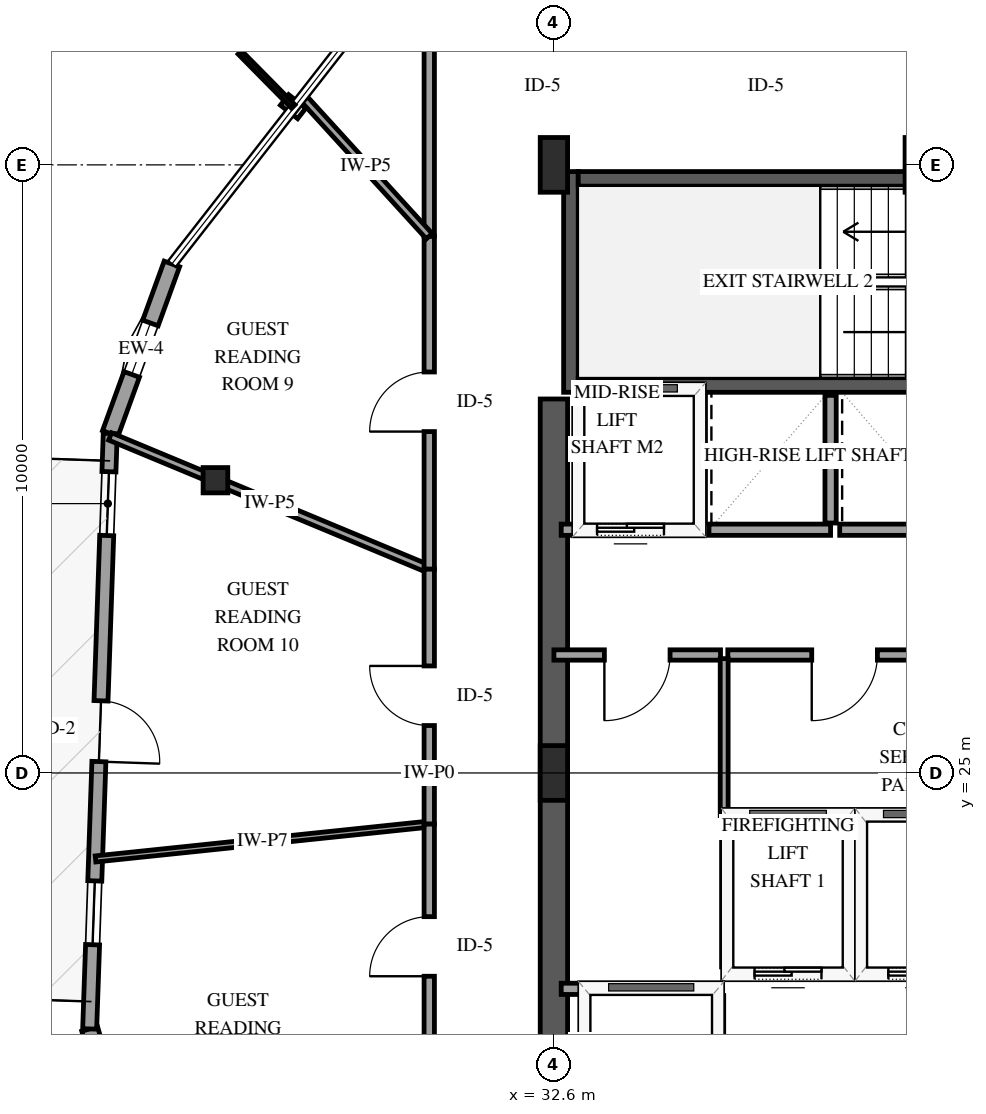
"""IFC4 building model, lengths in metres.
Left out: names, types, materials, properties, quantities, classifications, styles, units other than length and angle.
Written with IfcOpenShell. Run it as: python <this file> out.ifc"""

import sys

from ifc_helpers import new_model, si_unit, direction, frame, frame_2d, origin, origin_2d, place, context, subcontext, project, spatial, rectangle, i_section, extrude, element, fill, save


model = new_model("IFC4")
c1 = context("Model", 3, precision=1e-05, world=origin(), true_north=direction((0.0, 1.0)))
c2 = subcontext(c1, "Body", "Model", "MODEL_VIEW")
j1 = project(units=[si_unit("LENGTHUNIT", "METRE"), si_unit("PLANEANGLEUNIT", "RADIAN")], contexts=[c1])
p1 = place(None, origin())
s1 = spatial("IfcSite", under=j1, at=p1, CompositionType="ELEMENT")
p2 = place(p1, origin())
s2 = spatial("IfcBuilding", under=s1, at=p2, CompositionType="ELEMENT")
p3 = place(p2, frame((0.0, 0.0, 223.0)))
s3 = spatial("IfcBuildingStorey", under=s2, at=p3, CompositionType="ELEMENT", Elevation=223.0)
p4 = place(p3, frame((32.88, 31.26, 0.0), z_axis=(0.0, 0.0, 1.0), x_axis=(0.0, 1.0, 0.0)))
e1 = element("IfcWall", 1, at=p4, inside=s3, PredefinedType="SHEAR", context=c2, shape_type="SweptSolid", body=[
    extrude(rectangle(XDim=3.63, YDim=0.24, at=frame_2d((1.815, 0.0))), origin(), (0.0, 0.0, 1.0), 3.6),
])
for number, where, z_axis, x_axis in (
    (2, (33.0, 31.38, 0.0), (0.0, 0.0, 1.0), (1.0, 0.0, 0.0)),
    (3, (33.0, 34.77, 0.0), (0.0, 0.0, 1.0), (1.0, 0.0, 0.0)),
):
    element("IfcWall", number, at=place(p3, frame(where, z_axis=z_axis, x_axis=x_axis)), inside=s3, PredefinedType="SHEAR", context=c2, shape_type="SweptSolid", body=[
        extrude(rectangle(XDim=8.0, YDim=0.24, at=frame_2d((4.0, 0.0))), origin(), (0.0, 0.0, 1.0), 3.6),
    ])
p5 = place(p3, frame((32.6, 18.85, 0.0), z_axis=(0.0, 0.0, 1.0), x_axis=(0.0, 1.0, 0.0)))
e4 = element("IfcWall", 4, at=p5, inside=s3, PredefinedType="SHEAR", context=c2, shape_type="SweptSolid", body=[
    extrude(rectangle(XDim=12.3, YDim=0.45, at=frame_2d((6.15, 0.0))), origin(), (0.0, 0.0, 1.0), 3.6),
])
for number, where, z_axis, x_axis in (
    (5, (32.6, 25.0, 0.0), (0.0, 0.0, 1.0), (1.0, 0.0, 0.0)),
    (6, (32.6, 35.0, 0.0), (0.0, 0.0, 1.0), (1.0, 0.0, 0.0)),
    (7, (38.6, 35.0, 0.0), (0.0, 0.0, 1.0), (1.0, 0.0, 0.0)),
):
    element("IfcColumn", number, at=place(p3, frame(where, z_axis=z_axis, x_axis=x_axis)), inside=s3, PredefinedType="PILASTER", context=c2, shape_type="SweptSolid", body=[
        extrude(rectangle(XDim=0.45, YDim=0.9, at=origin_2d()), origin(), (0.0, 0.0, 1.0), 3.6),
    ])
p6 = place(p3, frame((27.034, 29.814, 0.0), z_axis=(0.0, 0.0, 1.0), x_axis=(1.0, 0.0, 0.0)))
e8 = element("IfcColumn", 8, at=p6, inside=s3, PredefinedType="COLUMN", context=c2, shape_type="SweptSolid", body=[
    extrude(i_section(OverallWidth=0.406, OverallDepth=0.416, WebThickness=0.03, FlangeThickness=0.048, FilletRadius=0.038, at=origin_2d()), origin(), (0.0, 0.0, 1.0), 3.6),
])
p7 = place(p3, frame((26.318, 33.371, 0.0), z_axis=(0.0, 0.0, 1.0), x_axis=(-0.341716630291, -0.939803034993, 0.0)))
e9 = element("IfcWall", 9, at=p7, inside=s3, PredefinedType="SOLIDWALL", context=c2, shape_type="SweptSolid", body=[
    extrude(rectangle(XDim=2.966, YDim=0.27, at=frame_2d((1.483, 0.0))), origin(), (0.0, 0.0, 1.0), 2.679),
])
p8 = place(p7, frame((1.033, 0.0, 0.75)))
e10 = element("IfcOpeningElement", 10, at=p8, cuts=e9, PredefinedType="OPENING", context=c2, shape_type="SweptSolid", body=[
    extrude(rectangle(XDim=0.9, YDim=1.5, at=frame_2d((0.45, 0.75))), frame((0.0, 0.145, 0.0), z_axis=(0.0, -1.0, 0.0), x_axis=(1.0, 0.0, 0.0)), (0.0, 0.0, 1.0), 0.29),
])
p9 = place(p3, frame((24.966, 20.791, 0.0), z_axis=(0.0, 0.0, 1.0), x_axis=(0.275927353379, -0.961178493131, 0.0)))
e11 = element("IfcWall", 11, at=p9, inside=s3, PredefinedType="SOLIDWALL", context=c2, shape_type="SweptSolid", body=[
    extrude(rectangle(XDim=2.967, YDim=0.27, at=frame_2d((1.483, 0.0))), origin(), (0.0, 0.0, 1.0), 2.679),
])
p10 = place(p9, frame((1.033, 0.0, 0.75)))
e12 = element("IfcOpeningElement", 12, at=p10, cuts=e11, PredefinedType="OPENING", context=c2, shape_type="SweptSolid", body=[
    extrude(rectangle(XDim=0.9, YDim=1.5, at=frame_2d((0.45, 0.75))), frame((0.0, 0.145, 0.0), z_axis=(0.0, -1.0, 0.0), x_axis=(1.0, 0.0, 0.0)), (0.0, 0.0, 1.0), 0.29),
])
p11 = place(p3, frame((25.304, 30.583, 0.0), z_axis=(0.0, 0.0, 1.0), x_axis=(-0.034536942247, -0.999403421857, 0.0)))
e13 = element("IfcWall", 13, at=p11, inside=s3, PredefinedType="SOLIDWALL", context=c2, shape_type="SweptSolid", body=[
    extrude(rectangle(XDim=9.798, YDim=0.23, at=frame_2d((4.899, 0.0))), origin(), (0.0, 0.0, 1.0), 2.679),
])
p12 = place(p11, frame((4.399, 0.0, 0.0)))
e14 = element("IfcOpeningElement", 14, at=p12, cuts=e13, PredefinedType="OPENING", context=c2, shape_type="SweptSolid", body=[
    extrude(rectangle(XDim=1.0, YDim=2.15, at=frame_2d((0.5, 1.075))), frame((0.0, 0.125, 0.0), z_axis=(0.0, -1.0, 0.0), x_axis=(1.0, 0.0, 0.0)), (0.0, 0.0, 1.0), 0.25),
])
p13 = place(p11, frame((0.629, 0.0, 0.72)))
e15 = element("IfcOpeningElement", 15, at=p13, cuts=e13, PredefinedType="OPENING", context=c2, shape_type="SweptSolid", body=[
    extrude(rectangle(XDim=1.05, YDim=1.55, at=frame_2d((0.525, 0.775))), frame((0.0, 0.125, 0.0), z_axis=(0.0, -1.0, 0.0), x_axis=(1.0, 0.0, 0.0)), (0.0, 0.0, 1.0), 0.25),
])
p14 = place(p11, frame((7.362, 0.0, 0.72)))
e16 = element("IfcOpeningElement", 16, at=p14, cuts=e13, PredefinedType="OPENING", context=c2, shape_type="SweptSolid", body=[
    extrude(rectangle(XDim=1.05, YDim=1.55, at=frame_2d((0.525, 0.775))), frame((0.0, 0.125, 0.0), z_axis=(0.0, -1.0, 0.0), x_axis=(1.0, 0.0, 0.0)), (0.0, 0.0, 1.0), 0.25),
])
p15 = place(p3, frame((35.45, 21.7, 0.0), z_axis=(0.0, 0.0, 1.0), x_axis=(1.0, 0.0, 0.0)))
e17 = element("IfcWall", 17, at=p15, inside=s3, PredefinedType="SOLIDWALL", context=c2, shape_type="SweptSolid", body=[
    extrude(rectangle(XDim=2.0, YDim=0.185, at=frame_2d((1.0, 0.0))), origin(), (0.0, 0.0, 1.0), 3.3),
])
p16 = place(p15, frame((0.45, 0.0, 0.0)))
e18 = element("IfcOpeningElement", 18, at=p16, cuts=e17, PredefinedType="OPENING", context=c2, shape_type="SweptSolid", body=[
    extrude(rectangle(XDim=1.1, YDim=2.15, at=frame_2d((0.55, 1.075))), frame((0.0, 0.103, 0.0), z_axis=(0.0, -1.0, 0.0), x_axis=(1.0, 0.0, 0.0)), (0.0, 0.0, 1.0), 0.205),
])
p17 = place(p3, frame((35.45, 24.3, 0.0), z_axis=(0.0, 0.0, 1.0), x_axis=(1.0, 0.0, 0.0)))
e19 = element("IfcWall", 19, at=p17, inside=s3, PredefinedType="SOLIDWALL", context=c2, shape_type="SweptSolid", body=[
    extrude(rectangle(XDim=2.0, YDim=0.185, at=frame_2d((1.0, 0.0))), origin(), (0.0, 0.0, 1.0), 3.3),
])
for number, where, z_axis, x_axis in (
    (20, (35.45, 21.81, 0.0), (0.0, 0.0, 1.0), (0.0, 1.0, 0.0)),
    (21, (37.45, 21.81, 0.0), (0.0, 0.0, 1.0), (0.0, 1.0, 0.0)),
):
    element("IfcWall", number, at=place(p3, frame(where, z_axis=z_axis, x_axis=x_axis)), inside=s3, PredefinedType="SOLIDWALL", context=c2, shape_type="SweptSolid", body=[
        extrude(rectangle(XDim=2.38, YDim=0.185, at=frame_2d((1.19, 0.0))), origin(), (0.0, 0.0, 1.0), 3.3),
    ])
p18 = place(p3, frame((37.65, 21.7, 0.0), z_axis=(0.0, 0.0, 1.0), x_axis=(1.0, 0.0, 0.0)))
e22 = element("IfcWall", 22, at=p18, inside=s3, PredefinedType="SOLIDWALL", context=c2, shape_type="SweptSolid", body=[
    extrude(rectangle(XDim=2.0, YDim=0.185, at=frame_2d((1.0, 0.0))), origin(), (0.0, 0.0, 1.0), 3.3),
])
p19 = place(p18, frame((0.45, 0.0, 0.0)))
e23 = element("IfcOpeningElement", 23, at=p19, cuts=e22, PredefinedType="OPENING", context=c2, shape_type="SweptSolid", body=[
    extrude(rectangle(XDim=1.1, YDim=2.15, at=frame_2d((0.55, 1.075))), frame((0.0, 0.103, 0.0), z_axis=(0.0, -1.0, 0.0), x_axis=(1.0, 0.0, 0.0)), (0.0, 0.0, 1.0), 0.205),
])
p20 = place(p3, frame((37.65, 24.3, 0.0), z_axis=(0.0, 0.0, 1.0), x_axis=(1.0, 0.0, 0.0)))
e24 = element("IfcWall", 24, at=p20, inside=s3, PredefinedType="SOLIDWALL", context=c2, shape_type="SweptSolid", body=[
    extrude(rectangle(XDim=2.0, YDim=0.185, at=frame_2d((1.0, 0.0))), origin(), (0.0, 0.0, 1.0), 3.3),
])
p21 = place(p3, frame((32.72, 21.45, 0.0), z_axis=(0.0, 0.0, 1.0), x_axis=(1.0, 0.0, 0.0)))
e25 = element("IfcWall", 25, at=p21, inside=s3, PredefinedType="SOLIDWALL", context=c2, shape_type="SweptSolid", body=[
    extrude(rectangle(XDim=2.58, YDim=0.185, at=frame_2d((1.29, 0.0))), origin(), (0.0, 0.0, 1.0), 3.3),
])
p22 = place(p3, frame((35.3, 18.79, 0.0), z_axis=(0.0, 0.0, 1.0), x_axis=(0.0, 1.0, 0.0)))
e26 = element("IfcWall", 26, at=p22, inside=s3, PredefinedType="SOLIDWALL", context=c2, shape_type="SweptSolid", body=[
    extrude(rectangle(XDim=2.55, YDim=0.185, at=frame_2d((1.275, 0.0))), origin(), (0.0, 0.0, 1.0), 3.3),
])
p23 = place(p22, frame((0.725, 0.0, 0.0)))
e27 = element("IfcOpeningElement", 27, at=p23, cuts=e26, PredefinedType="OPENING", context=c2, shape_type="SweptSolid", body=[
    extrude(rectangle(XDim=1.1, YDim=2.15, at=frame_2d((0.55, 1.075))), frame((0.0, 0.103, 0.0), z_axis=(0.0, -1.0, 0.0), x_axis=(1.0, 0.0, 0.0)), (0.0, 0.0, 1.0), 0.205),
])
p24 = place(p3, frame((32.72, 29.0, 0.0), z_axis=(0.0, 0.0, 1.0), x_axis=(1.0, 0.0, 0.0)))
e28 = element("IfcWall", 28, at=p24, inside=s3, PredefinedType="SOLIDWALL", context=c2, shape_type="SweptSolid", body=[
    extrude(rectangle(XDim=2.28, YDim=0.185, at=frame_2d((1.14, 0.0))), origin(), (0.0, 0.0, 1.0), 3.3),
])
p25 = place(p24, frame((0.59, 0.0, 0.0)))
e29 = element("IfcOpeningElement", 29, at=p25, cuts=e28, PredefinedType="OPENING", context=c2, shape_type="SweptSolid", body=[
    extrude(rectangle(XDim=1.1, YDim=2.15, at=frame_2d((0.55, 1.075))), frame((0.0, 0.103, 0.0), z_axis=(0.0, -1.0, 0.0), x_axis=(1.0, 0.0, 0.0)), (0.0, 0.0, 1.0), 0.205),
])
p26 = place(p3, frame((35.0, 29.11, 0.0), z_axis=(0.0, 0.0, 1.0), x_axis=(0.0, 1.0, 0.0)))
e30 = element("IfcWall", 30, at=p26, inside=s3, PredefinedType="SOLIDWALL", context=c2, shape_type="SweptSolid", body=[
    extrude(rectangle(XDim=2.1, YDim=0.185, at=frame_2d((1.05, 0.0))), origin(), (0.0, 0.0, 1.0), 3.3),
])
p27 = place(p3, frame((35.15, 29.0, 0.0), z_axis=(0.0, 0.0, 1.0), x_axis=(1.0, 0.0, 0.0)))
e31 = element("IfcWall", 31, at=p27, inside=s3, PredefinedType="SOLIDWALL", context=c2, shape_type="SweptSolid", body=[
    extrude(rectangle(XDim=2.0, YDim=0.185, at=frame_2d((1.0, 0.0))), origin(), (0.0, 0.0, 1.0), 3.3),
])
p28 = place(p3, frame((37.15, 29.11, 0.0), z_axis=(0.0, 0.0, 1.0), x_axis=(0.0, 1.0, 0.0)))
e32 = element("IfcWall", 32, at=p28, inside=s3, PredefinedType="SOLIDWALL", context=c2, shape_type="SweptSolid", body=[
    extrude(rectangle(XDim=2.1, YDim=0.185, at=frame_2d((1.05, 0.0))), origin(), (0.0, 0.0, 1.0), 3.3),
])
p29 = place(p3, frame((37.3, 29.0, 0.0), z_axis=(0.0, 0.0, 1.0), x_axis=(1.0, 0.0, 0.0)))
e33 = element("IfcWall", 33, at=p29, inside=s3, PredefinedType="SOLIDWALL", context=c2, shape_type="SweptSolid", body=[
    extrude(rectangle(XDim=2.0, YDim=0.185, at=frame_2d((1.0, 0.0))), origin(), (0.0, 0.0, 1.0), 3.3),
])
p30 = place(p3, frame((30.55, 28.351, 0.0), z_axis=(0.0, 0.0, 1.0), x_axis=(-0.923315654645, 0.384041927251, 0.0)))
e34 = element("IfcWall", 34, at=p30, inside=s3, PredefinedType="PARTITIONING", context=c2, shape_type="SweptSolid", body=[
    extrude(rectangle(XDim=5.684, YDim=0.13, at=frame_2d((2.842, 0.0))), origin(), (0.0, 0.0, 1.0), 3.3),
])
p31 = place(p3, frame((30.55, 24.159, 0.0), z_axis=(0.0, 0.0, 1.0), x_axis=(-0.994593588522, -0.103844083467, 0.0)))
e35 = element("IfcWall", 35, at=p31, inside=s3, PredefinedType="PARTITIONING", context=c2, shape_type="SweptSolid", body=[
    extrude(rectangle(XDim=5.518, YDim=0.1, at=frame_2d((2.759, 0.0))), origin(), (0.0, 0.0, 1.0), 2.674),
])
p32 = place(p3, frame((30.55, 28.351, 0.0), z_axis=(0.0, 0.0, 1.0), x_axis=(0.0, 1.0, 0.0)))
e36 = element("IfcWall", 36, at=p32, inside=s3, PredefinedType="PARTITIONING", context=c2, shape_type="SweptSolid", body=[
    extrude(rectangle(XDim=5.476, YDim=0.17, at=frame_2d((2.738, 0.0))), origin(), (0.0, 0.0, 1.0), 3.3),
])
p33 = place(p32, frame((2.263, 0.0, 0.0)))
e37 = element("IfcOpeningElement", 37, at=p33, cuts=e36, PredefinedType="OPENING", context=c2, shape_type="SweptSolid", body=[
    extrude(rectangle(XDim=0.98, YDim=2.15, at=frame_2d((0.49, 1.075))), frame((0.0, 0.095, 0.0), z_axis=(0.0, -1.0, 0.0), x_axis=(1.0, 0.0, 0.0)), (0.0, 0.0, 1.0), 0.19),
])
p34 = place(p3, frame((30.55, 24.159, 0.0), z_axis=(0.0, 0.0, 1.0), x_axis=(0.0, 1.0, 0.0)))
e38 = element("IfcWall", 38, at=p34, inside=s3, PredefinedType="PARTITIONING", context=c2, shape_type="SweptSolid", body=[
    extrude(rectangle(XDim=4.192, YDim=0.17, at=frame_2d((2.096, 0.0))), origin(), (0.0, 0.0, 1.0), 3.3),
])
p35 = place(p34, frame((1.621, 0.0, 0.0)))
e39 = element("IfcOpeningElement", 39, at=p35, cuts=e38, PredefinedType="OPENING", context=c2, shape_type="SweptSolid", body=[
    extrude(rectangle(XDim=0.98, YDim=2.15, at=frame_2d((0.49, 1.075))), frame((0.0, 0.095, 0.0), z_axis=(0.0, -1.0, 0.0), x_axis=(1.0, 0.0, 0.0)), (0.0, 0.0, 1.0), 0.19),
])
p36 = place(p3, frame((30.55, 20.106, 0.0), z_axis=(0.0, 0.0, 1.0), x_axis=(0.0, 1.0, 0.0)))
e40 = element("IfcWall", 40, at=p36, inside=s3, PredefinedType="PARTITIONING", context=c2, shape_type="SweptSolid", body=[
    extrude(rectangle(XDim=4.053, YDim=0.17, at=frame_2d((2.026, 0.0))), origin(), (0.0, 0.0, 1.0), 3.3),
])
p37 = place(p36, frame((1.551, 0.0, 0.0)))
e41 = element("IfcOpeningElement", 41, at=p37, cuts=e40, PredefinedType="OPENING", context=c2, shape_type="SweptSolid", body=[
    extrude(rectangle(XDim=0.98, YDim=2.15, at=frame_2d((0.49, 1.075))), frame((0.0, 0.095, 0.0), z_axis=(0.0, -1.0, 0.0), x_axis=(1.0, 0.0, 0.0)), (0.0, 0.0, 1.0), 0.19),
])
p38 = place(p3, frame((39.3, 26.94, 0.0), z_axis=(0.0, 0.0, 1.0), x_axis=(-1.0, 0.0, 0.0)))
e42 = element("IfcWall", 42, at=p38, inside=s3, PredefinedType="PARTITIONING", context=c2, shape_type="SweptSolid", body=[
    extrude(rectangle(XDim=3.84, YDim=0.17, at=frame_2d((1.92, 0.0))), origin(), (0.0, 0.0, 1.0), 3.3),
])
p39 = place(p38, frame((1.38, 0.0, 0.0)))
e43 = element("IfcOpeningElement", 43, at=p39, cuts=e42, PredefinedType="OPENING", context=c2, shape_type="SweptSolid", body=[
    extrude(rectangle(XDim=1.08, YDim=2.15, at=frame_2d((0.54, 1.075))), frame((0.0, 0.095, 0.0), z_axis=(0.0, -1.0, 0.0), x_axis=(1.0, 0.0, 0.0)), (0.0, 0.0, 1.0), 0.19),
])
p40 = place(p3, frame((30.55, 33.827, 0.0), z_axis=(0.0, 0.0, 1.0), x_axis=(0.0, 1.0, 0.0)))
e44 = element("IfcWall", 44, at=p40, inside=s3, PredefinedType="PARTITIONING", context=c2, shape_type="SweptSolid", body=[
    extrude(rectangle(XDim=3.153, YDim=0.17, at=frame_2d((1.577, 0.0))), origin(), (0.0, 0.0, 1.0), 3.3),
])
p41 = place(p3, frame((30.55, 33.827, 0.0), z_axis=(0.0, 0.0, 1.0), x_axis=(-0.673781691583, 0.738930464988, 0.0)))
e45 = element("IfcWall", 45, at=p41, inside=s3, PredefinedType="PARTITIONING", context=c2, shape_type="SweptSolid", body=[
    extrude(rectangle(XDim=3.099, YDim=0.13, at=frame_2d((1.55, 0.0))), origin(), (0.0, 0.0, 1.0), 3.3),
])
p42 = place(p3, frame((35.34, 26.94, 0.0), z_axis=(0.0, 0.0, 1.0), x_axis=(-1.0, 0.0, 0.0)))
e46 = element("IfcWall", 46, at=p42, inside=s3, PredefinedType="PARTITIONING", context=c2, shape_type="SweptSolid", body=[
    extrude(rectangle(XDim=2.74, YDim=0.17, at=frame_2d((1.37, 0.0))), origin(), (0.0, 0.0, 1.0), 3.3),
])
p43 = place(p42, frame((0.83, 0.0, 0.0)))
e47 = element("IfcOpeningElement", 47, at=p43, cuts=e46, PredefinedType="OPENING", context=c2, shape_type="SweptSolid", body=[
    extrude(rectangle(XDim=1.08, YDim=2.15, at=frame_2d((0.54, 1.075))), frame((0.0, 0.095, 0.0), z_axis=(0.0, -1.0, 0.0), x_axis=(1.0, 0.0, 0.0)), (0.0, 0.0, 1.0), 0.19),
])
p44 = place(p3, frame((35.4, 26.88, 0.0), z_axis=(0.0, 0.0, 1.0), x_axis=(0.0, -1.0, 0.0)))
e48 = element("IfcWall", 48, at=p44, inside=s3, PredefinedType="PARTITIONING", context=c2, shape_type="SweptSolid", body=[
    extrude(rectangle(XDim=2.58, YDim=0.13, at=frame_2d((1.29, 0.0))), origin(), (0.0, 0.0, 1.0), 3.3),
])
p45 = place(p8, origin())
e49 = element("IfcWindow", 49, at=p45, inside=s3, PartitioningType="SINGLE_PANEL", PredefinedType="WINDOW", context=c2, shape_type="SweptSolid", body=[
    extrude(rectangle(XDim=0.9, YDim=1.5, at=frame_2d((0.45, 0.75))), frame((0.0, 0.03, 0.0), z_axis=(0.0, -1.0, 0.0), x_axis=(1.0, 0.0, 0.0)), (0.0, 0.0, 1.0), 0.06),
])
fill(e10, e49)
p46 = place(p12, origin())
e50 = element("IfcDoor", 50, at=p46, inside=s3, OperationType="SINGLE_SWING_RIGHT", PredefinedType="DOOR", context=c2, shape_type="SweptSolid", body=[
    extrude(rectangle(XDim=1.0, YDim=2.15, at=frame_2d((0.5, 1.075))), frame((0.0, 0.025, 0.0), z_axis=(0.0, -1.0, 0.0), x_axis=(1.0, 0.0, 0.0)), (0.0, 0.0, 1.0), 0.05),
])
fill(e14, e50)
p47 = place(p13, origin())
e51 = element("IfcWindow", 51, at=p47, inside=s3, PartitioningType="SINGLE_PANEL", PredefinedType="WINDOW", context=c2, shape_type="SweptSolid", body=[
    extrude(rectangle(XDim=1.05, YDim=1.55, at=frame_2d((0.525, 0.775))), frame((0.0, 0.03, 0.0), z_axis=(0.0, -1.0, 0.0), x_axis=(1.0, 0.0, 0.0)), (0.0, 0.0, 1.0), 0.06),
])
fill(e15, e51)
p48 = place(p14, origin())
e52 = element("IfcWindow", 52, at=p48, inside=s3, PartitioningType="SINGLE_PANEL", PredefinedType="WINDOW", context=c2, shape_type="SweptSolid", body=[
    extrude(rectangle(XDim=1.05, YDim=1.55, at=frame_2d((0.525, 0.775))), frame((0.0, 0.03, 0.0), z_axis=(0.0, -1.0, 0.0), x_axis=(1.0, 0.0, 0.0)), (0.0, 0.0, 1.0), 0.06),
])
fill(e16, e52)
p49 = place(p16, origin())
e53 = element("IfcDoor", 53, at=p49, inside=s3, OperationType="SLIDING_TO_LEFT", PredefinedType="DOOR", context=c2, shape_type="SweptSolid", body=[
    extrude(rectangle(XDim=1.1, YDim=2.15, at=frame_2d((0.55, 1.075))), frame((0.0, 0.025, 0.0), z_axis=(0.0, -1.0, 0.0), x_axis=(1.0, 0.0, 0.0)), (0.0, 0.0, 1.0), 0.05),
])
fill(e18, e53)
p50 = place(p19, origin())
e54 = element("IfcDoor", 54, at=p50, inside=s3, OperationType="SLIDING_TO_LEFT", PredefinedType="DOOR", context=c2, shape_type="SweptSolid", body=[
    extrude(rectangle(XDim=1.1, YDim=2.15, at=frame_2d((0.55, 1.075))), frame((0.0, 0.025, 0.0), z_axis=(0.0, -1.0, 0.0), x_axis=(1.0, 0.0, 0.0)), (0.0, 0.0, 1.0), 0.05),
])
fill(e23, e54)
p51 = place(p25, origin())
e55 = element("IfcDoor", 55, at=p51, inside=s3, OperationType="SLIDING_TO_LEFT", PredefinedType="DOOR", context=c2, shape_type="SweptSolid", body=[
    extrude(rectangle(XDim=1.1, YDim=2.15, at=frame_2d((0.55, 1.075))), frame((0.0, 0.025, 0.0), z_axis=(0.0, -1.0, 0.0), x_axis=(1.0, 0.0, 0.0)), (0.0, 0.0, 1.0), 0.05),
])
fill(e29, e55)
p52 = place(p33, origin())
e56 = element("IfcDoor", 56, at=p52, inside=s3, OperationType="SINGLE_SWING_LEFT", PredefinedType="DOOR", context=c2, shape_type="SweptSolid", body=[
    extrude(rectangle(XDim=0.98, YDim=2.15, at=frame_2d((0.49, 1.075))), frame((0.0, 0.025, 0.0), z_axis=(0.0, -1.0, 0.0), x_axis=(1.0, 0.0, 0.0)), (0.0, 0.0, 1.0), 0.05),
])
fill(e37, e56)
p53 = place(p35, origin())
e57 = element("IfcDoor", 57, at=p53, inside=s3, OperationType="SINGLE_SWING_RIGHT", PredefinedType="DOOR", context=c2, shape_type="SweptSolid", body=[
    extrude(rectangle(XDim=0.98, YDim=2.15, at=frame_2d((0.49, 1.075))), frame((0.0, 0.025, 0.0), z_axis=(0.0, -1.0, 0.0), x_axis=(1.0, 0.0, 0.0)), (0.0, 0.0, 1.0), 0.05),
])
fill(e39, e57)
p54 = place(p37, origin())
e58 = element("IfcDoor", 58, at=p54, inside=s3, OperationType="SINGLE_SWING_LEFT", PredefinedType="DOOR", context=c2, shape_type="SweptSolid", body=[
    extrude(rectangle(XDim=0.98, YDim=2.15, at=frame_2d((0.49, 1.075))), frame((0.0, 0.025, 0.0), z_axis=(0.0, -1.0, 0.0), x_axis=(1.0, 0.0, 0.0)), (0.0, 0.0, 1.0), 0.05),
])
fill(e41, e58)
p55 = place(p39, origin())
e59 = element("IfcDoor", 59, at=p55, inside=s3, OperationType="SINGLE_SWING_RIGHT", PredefinedType="DOOR", context=c2, shape_type="SweptSolid", body=[
    extrude(rectangle(XDim=1.08, YDim=2.15, at=frame_2d((0.54, 1.075))), frame((0.0, 0.025, 0.0), z_axis=(0.0, -1.0, 0.0), x_axis=(1.0, 0.0, 0.0)), (0.0, 0.0, 1.0), 0.05),
])
fill(e43, e59)
p56 = place(p43, origin())
e60 = element("IfcDoor", 60, at=p56, inside=s3, OperationType="SINGLE_SWING_RIGHT", PredefinedType="DOOR", context=c2, shape_type="SweptSolid", body=[
    extrude(rectangle(XDim=1.08, YDim=2.15, at=frame_2d((0.54, 1.075))), frame((0.0, 0.025, 0.0), z_axis=(0.0, -1.0, 0.0), x_axis=(1.0, 0.0, 0.0)), (0.0, 0.0, 1.0), 0.05),
])
fill(e47, e60)
save(model, sys.argv[1])
